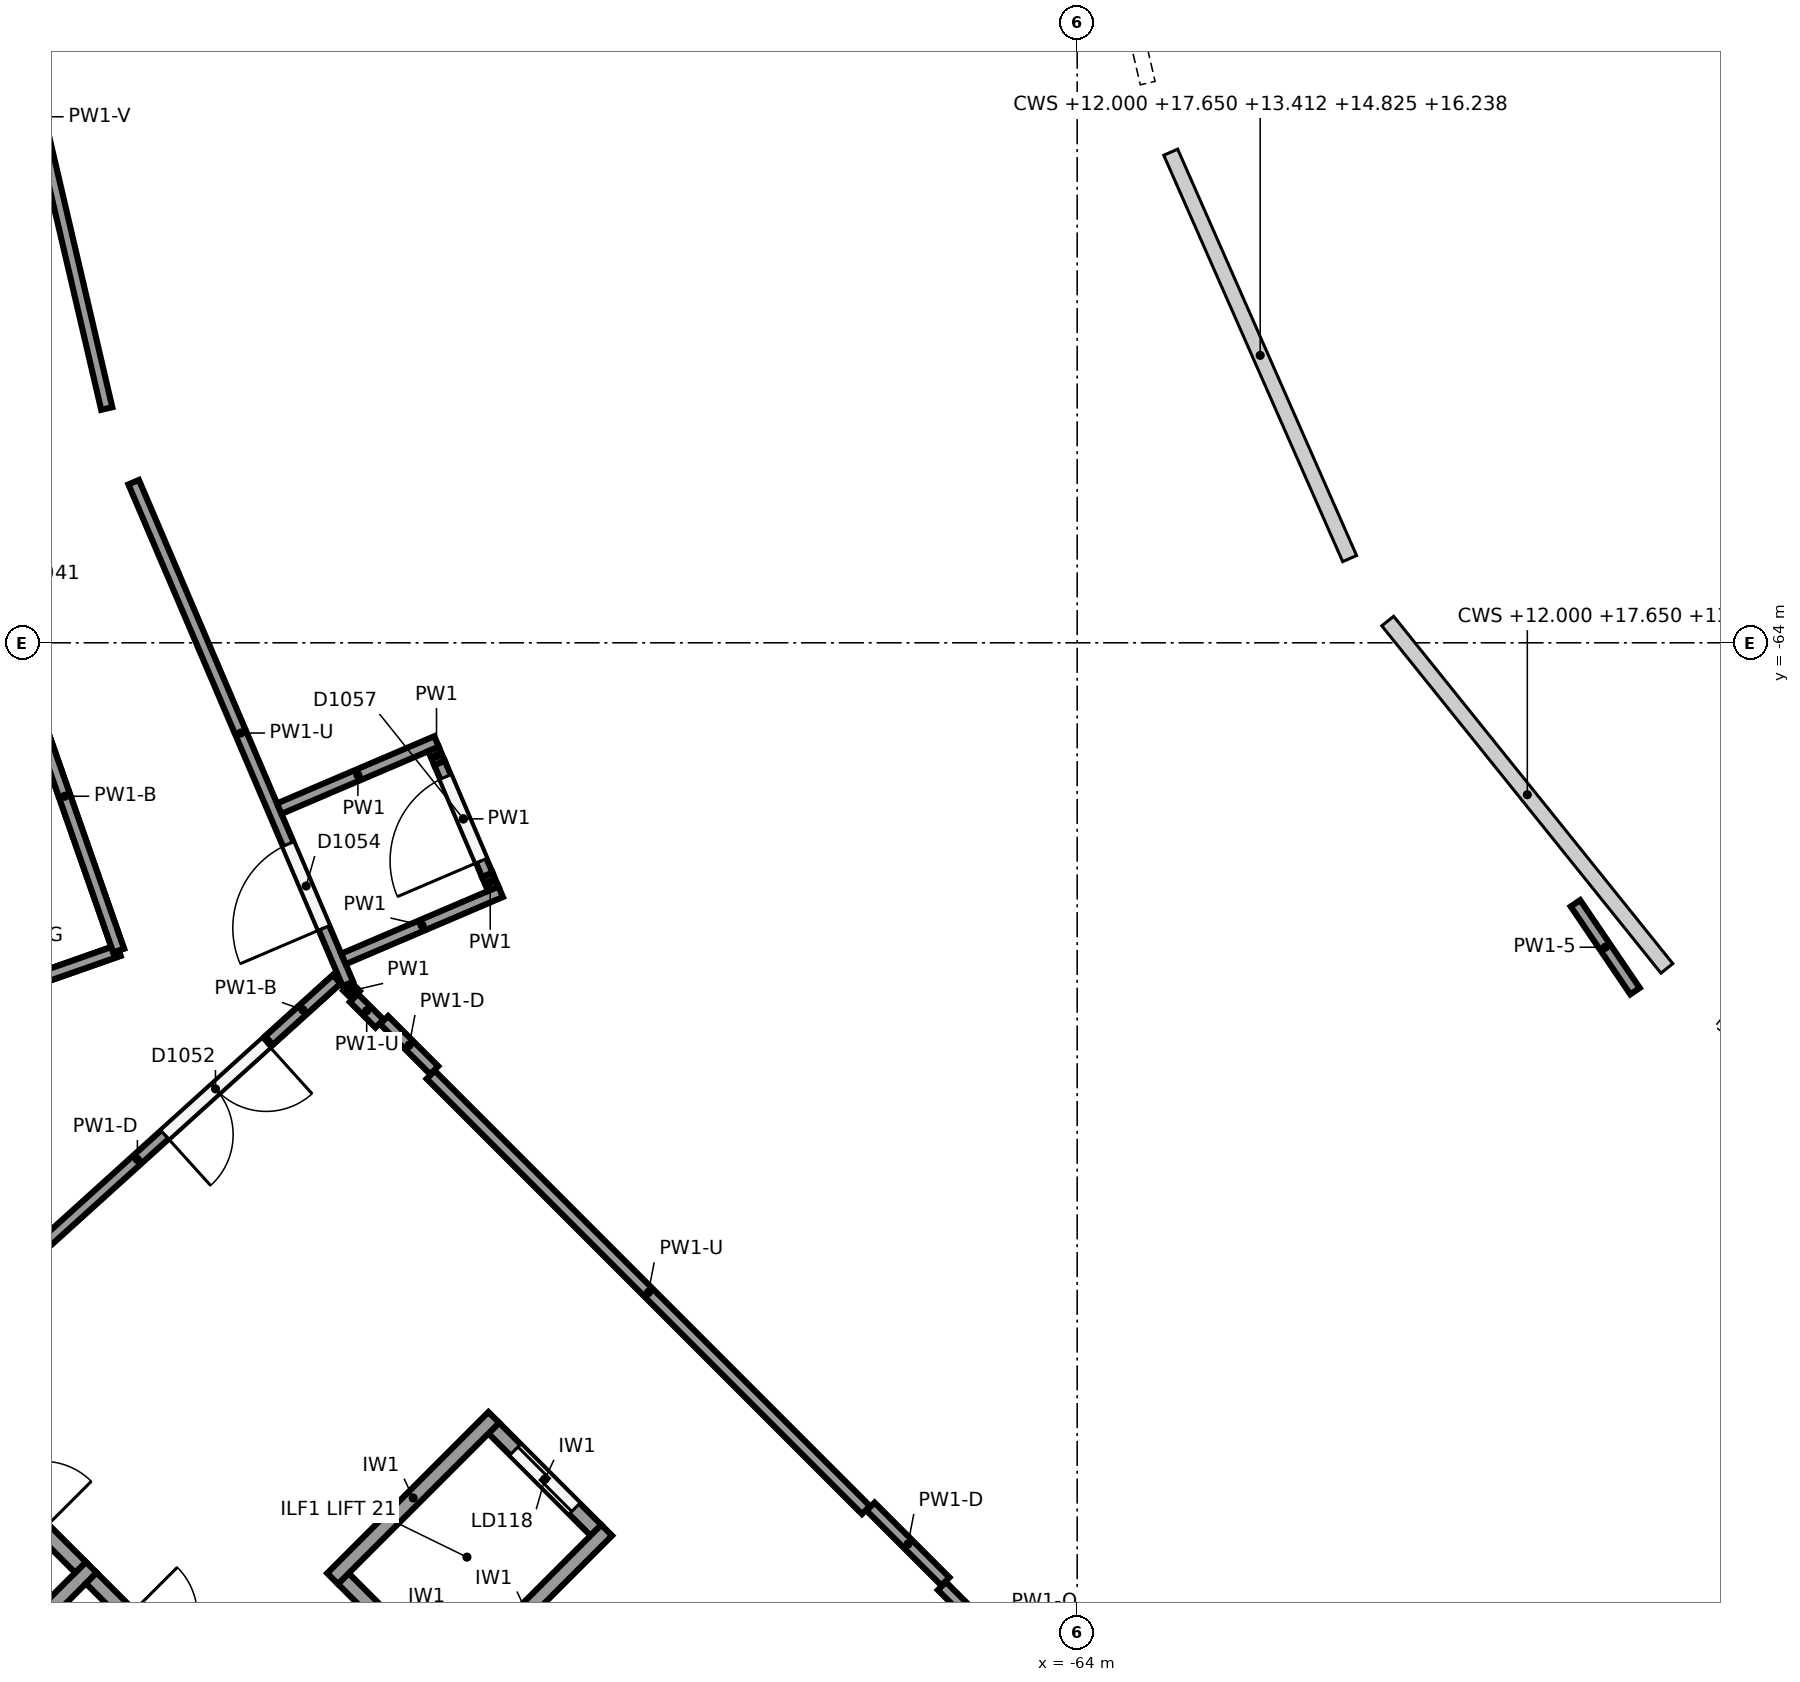
"""IFC4 building model, lengths in metres.
Left out: names, types, materials, properties, quantities, classifications, styles, units other than length and angle.
Written with IfcOpenShell. Run it as: python <this file> out.ifc"""

import sys

from ifc_helpers import new_model, si_unit, direction, frame, frame_2d, origin, origin_2d, place, context, subcontext, project, spatial, rectangle, circle, extrude, element, fill, save


model = new_model("IFC4")
c1 = context("Model", 3, precision=1e-05, world=origin(), true_north=direction((0.0, 1.0)))
c2 = subcontext(c1, "Body", "Model", "MODEL_VIEW")
j1 = project(units=[si_unit("LENGTHUNIT", "METRE"), si_unit("PLANEANGLEUNIT", "RADIAN")], contexts=[c1])
p1 = place(None, origin())
s1 = spatial("IfcSite", under=j1, at=p1, CompositionType="ELEMENT")
p2 = place(p1, origin())
s2 = spatial("IfcBuilding", under=s1, at=p2, CompositionType="ELEMENT")
p3 = place(p2, frame((0.0, 0.0, 12.0)))
s3 = spatial("IfcBuildingStorey", under=s2, at=p3, CompositionType="ELEMENT", Elevation=12.0)
p4 = place(p3, frame((-61.723, -56.716, 0.0), z_axis=(0.0, 0.0, 1.0), x_axis=(1.0, 0.0, 0.0)))
e1 = element("IfcColumn", 1, at=p4, inside=s3, PredefinedType="COLUMN", context=c2, shape_type="SweptSolid", body=[
    extrude(circle(Radius=0.45, at=origin_2d()), origin(), (0.0, 0.0, 1.0), 2.877),
])
p5 = place(p3, frame((-62.964, -57.104, 0.0), z_axis=(0.0, 0.0, 1.0), x_axis=(1.0, 0.0, 0.0)))
e2 = element("IfcColumn", 2, at=p5, inside=s3, PredefinedType="COLUMN", context=c2, shape_type="SweptSolid", body=[
    extrude(circle(Radius=0.4, at=origin_2d()), origin(), (0.0, 0.0, 1.0), 4.305),
])
p6 = place(p3, frame((-71.17, -59.677, 0.0), z_axis=(0.0, 0.0, 1.0), x_axis=(1.0, 0.0, 0.0)))
e3 = element("IfcColumn", 3, at=p6, inside=s3, PredefinedType="COLUMN", context=c2, shape_type="SweptSolid", body=[
    extrude(circle(Radius=0.45, at=origin_2d()), origin(), (0.0, 0.0, 1.0), 6.0),
])
p7 = place(p3, frame((-59.049, -62.766, 0.0), z_axis=(0.0, 0.0, 1.0), x_axis=(1.0, 0.0, 0.0)))
e4 = element("IfcColumn", 4, at=p7, inside=s3, PredefinedType="COLUMN", context=c2, shape_type="SweptSolid", body=[
    extrude(circle(Radius=0.45, at=origin_2d()), origin(), (0.0, 0.0, 1.0), 3.132),
])
p8 = place(p3, frame((-60.222, -63.331, 0.0), z_axis=(0.0, 0.0, 1.0), x_axis=(1.0, 0.0, 0.0)))
e5 = element("IfcColumn", 5, at=p8, inside=s3, PredefinedType="COLUMN", context=c2, shape_type="SweptSolid", body=[
    extrude(circle(Radius=0.4, at=origin_2d()), origin(), (0.0, 0.0, 1.0), 4.561),
])
p9 = place(p3, frame((-67.972, -67.058, 0.0), z_axis=(0.0, 0.0, 1.0), x_axis=(1.0, 0.0, 0.0)))
e6 = element("IfcColumn", 6, at=p9, inside=s3, PredefinedType="COLUMN", context=c2, shape_type="SweptSolid", body=[
    extrude(circle(Radius=0.45, at=origin_2d()), origin(), (0.0, 0.0, 1.0), 6.0),
])
p10 = place(p3, frame((-55.94, -68.658, 0.0), z_axis=(0.0, 0.0, 1.0), x_axis=(1.0, 0.0, 0.0)))
e7 = element("IfcColumn", 7, at=p10, inside=s3, PredefinedType="COLUMN", context=c2, shape_type="SweptSolid", body=[
    extrude(circle(Radius=0.4, at=origin_2d()), origin(), (0.0, 0.0, 1.0), 4.729),
])
p11 = place(p3, frame((-63.068, -73.47, 0.0), z_axis=(0.0, 0.0, 1.0), x_axis=(1.0, 0.0, 0.0)))
e8 = element("IfcColumn", 8, at=p11, inside=s3, PredefinedType="COLUMN", context=c2, shape_type="SweptSolid", body=[
    extrude(circle(Radius=0.45, at=origin_2d()), origin(), (0.0, 0.0, 1.0), 6.0),
])
p12 = place(p3, frame((-78.173, -77.365, 0.0), z_axis=(0.0, 0.0, 1.0), x_axis=(0.707178586901, 0.707034968179, 0.0)))
e9 = element("IfcWall", 9, at=p12, inside=s3, PredefinedType="SHEAR", context=c2, shape_type="SweptSolid", body=[
    extrude(rectangle(XDim=1.7, YDim=0.2, at=frame_2d((0.85, 0.0))), origin(), (0.0, 0.0, 1.0), 5.65),
])
p13 = place(p3, frame((-79.375, -73.9, 0.0), z_axis=(0.0, 0.0, 1.0), x_axis=(0.707068634461, -0.707144925854, 0.0)))
e10 = element("IfcWall", 10, at=p13, inside=s3, PredefinedType="SHEAR", context=c2, shape_type="SweptSolid", body=[
    extrude(rectangle(XDim=3.2, YDim=0.2, at=frame_2d((1.6, 0.0))), origin(), (0.0, 0.0, 1.0), 5.65),
])
p14 = place(p13, frame((0.7, 0.0, 0.0)))
e11 = element("IfcOpeningElement", 11, at=p14, cuts=e10, PredefinedType="OPENING", context=c2, shape_type="SweptSolid", body=[
    extrude(rectangle(XDim=1.8, YDim=2.1, at=frame_2d((0.9, 1.05))), frame((0.0, 0.11, 0.0), z_axis=(0.0, -1.0, 0.0), x_axis=(1.0, 0.0, 0.0)), (0.0, 0.0, 1.0), 0.22),
])
p15 = place(p3, frame((-76.971, -76.304, 0.0), z_axis=(0.0, 0.0, 1.0), x_axis=(0.707106781187, -0.707106781187, 0.0)))
e12 = element("IfcWall", 12, at=p15, inside=s3, PredefinedType="SHEAR", context=c2, shape_type="SweptSolid", body=[
    extrude(rectangle(XDim=3.2, YDim=0.2, at=frame_2d((1.6, 0.0))), origin(), (0.0, 0.0, 1.0), 5.65),
])
p16 = place(p15, frame((0.7, 0.0, 0.0)))
e13 = element("IfcOpeningElement", 13, at=p16, cuts=e12, PredefinedType="OPENING", context=c2, shape_type="SweptSolid", body=[
    extrude(rectangle(XDim=1.8, YDim=2.1, at=frame_2d((0.9, 1.05))), frame((0.0, 0.11, 0.0), z_axis=(0.0, -1.0, 0.0), x_axis=(1.0, 0.0, 0.0)), (0.0, 0.0, 1.0), 0.22),
])
for number, where, z_axis, x_axis in (
    (14, (-73.797, -76.312, 0.0), (0.0, 0.0, 1.0), (0.707, 0.707, 0.0)),
    (15, (-72.312, -77.797, 0.0), (0.0, 0.0, 1.0), (0.707, 0.707, 0.0)),
):
    element("IfcWall", number, at=place(p3, frame(where, z_axis=z_axis, x_axis=x_axis)), inside=s3, PredefinedType="SHEAR", context=c2, shape_type="SweptSolid", body=[
        extrude(rectangle(XDim=3.0, YDim=0.2, at=frame_2d((1.5, 0.0))), origin(), (0.0, 0.0, 1.0), 5.65),
    ])
p17 = place(p3, frame((-73.656, -76.312, 0.0), z_axis=(0.0, 0.0, 1.0), x_axis=(0.707106781187, -0.707106781187, 0.0)))
e16 = element("IfcWall", 16, at=p17, inside=s3, PredefinedType="SHEAR", context=c2, shape_type="SweptSolid", body=[
    extrude(rectangle(XDim=1.9, YDim=0.2, at=frame_2d((0.95, 0.0))), origin(), (0.0, 0.0, 1.0), 5.65),
])
p18 = place(p3, frame((-71.676, -74.332, 0.0), z_axis=(0.0, 0.0, 1.0), x_axis=(0.707106781187, -0.707106781187, 0.0)))
e17 = element("IfcWall", 17, at=p18, inside=s3, PredefinedType="SHEAR", context=c2, shape_type="SweptSolid", body=[
    extrude(rectangle(XDim=1.9, YDim=0.2, at=frame_2d((0.95, 0.0))), origin(), (0.0, 0.0, 1.0), 5.65),
])
p19 = place(p18, frame((0.4, 0.0, 0.0)))
e18 = element("IfcOpeningElement", 18, at=p19, cuts=e17, PredefinedType="OPENING", context=c2, shape_type="SweptSolid", body=[
    extrude(rectangle(XDim=1.1, YDim=2.1, at=frame_2d((0.55, 1.05))), frame((0.0, 0.11, 0.0), z_axis=(0.0, -1.0, 0.0), x_axis=(1.0, 0.0, 0.0)), (0.0, 0.0, 1.0), 0.22),
])
p20 = place(p3, frame((-76.768, -60.918, 0.0), z_axis=(0.0, 0.0, 1.0), x_axis=(-0.226944673482, 0.973907652284, 0.0)))
e19 = element("IfcWall", 19, at=p20, inside=s3, PredefinedType="PARTITIONING", context=c2, shape_type="SweptSolid", body=[
    extrude(rectangle(XDim=7.882, YDim=0.15, at=frame_2d((3.941, 0.0))), origin(), (0.0, 0.0, 1.0), 3.962),
])
p21 = place(p3, frame((-57.444, -67.427, 0.0), z_axis=(0.0, 0.0, 1.0), x_axis=(0.56118064085, -0.827693354048, 0.0)))
e20 = element("IfcWall", 20, at=p21, inside=s3, PredefinedType="PARTITIONING", context=c2, shape_type="SweptSolid", body=[
    extrude(rectangle(XDim=1.396, YDim=0.15, at=frame_2d((0.698, 0.0))), origin(), (0.0, 0.0, 1.0), 4.156),
])
p22 = place(p3, frame((-66.779, -75.41, 0.0), z_axis=(0.0, 0.0, 1.0), x_axis=(-0.707091708943, 0.707121853109, 0.0)))
e21 = element("IfcWall", 21, at=p22, inside=s3, PredefinedType="PARTITIONING", context=c2, shape_type="SweptSolid", body=[
    extrude(rectangle(XDim=8.099, YDim=0.15, at=frame_2d((4.05, 0.0))), origin(), (0.0, 0.0, 1.0), 4.187),
])
p23 = place(p3, frame((-73.179, -69.01, 0.0), z_axis=(0.0, 0.0, 1.0), x_axis=(-0.707106781187, 0.707106781187, 0.0)))
e22 = element("IfcWall", 22, at=p23, inside=s3, PredefinedType="PARTITIONING", context=c2, shape_type="SweptSolid", body=[
    extrude(rectangle(XDim=0.477, YDim=0.15, at=frame_2d((0.238, 0.0))), origin(), (0.0, 0.0, 1.0), 4.187),
])
p24 = place(p3, frame((-73.595, -68.488, 0.0), z_axis=(0.0, 0.0, 1.0), x_axis=(-0.392716080943, 0.919659763047, 0.0)))
e23 = element("IfcWall", 23, at=p24, inside=s3, PredefinedType="PARTITIONING", context=c2, shape_type="SweptSolid", body=[
    extrude(rectangle(XDim=7.177, YDim=0.15, at=frame_2d((3.589, 0.0))), origin(), (0.0, 0.0, 1.0), 4.187),
])
p25 = place(p24, frame((0.8, 0.0, 0.0)))
e24 = element("IfcOpeningElement", 24, at=p25, cuts=e23, PredefinedType="OPENING", context=c2, shape_type="SweptSolid", body=[
    extrude(rectangle(XDim=1.2, YDim=2.1, at=frame_2d((0.6, 1.05))), frame((0.0, 0.085, 0.0), z_axis=(0.0, -1.0, 0.0), x_axis=(1.0, 0.0, 0.0)), (0.0, 0.0, 1.0), 0.17),
])
p26 = place(p3, frame((-64.216, -77.973, 0.0), z_axis=(0.0, 0.0, 1.0), x_axis=(-0.707161957089, 0.707051600978, 0.0)))
e25 = element("IfcWall", 25, at=p26, inside=s3, PredefinedType="PARTITIONING", context=c2, shape_type="SweptSolid", body=[
    extrude(rectangle(XDim=2.212, YDim=0.15, at=frame_2d((1.106, 0.0))), origin(), (0.0, 0.0, 1.0), 4.118),
])
p27 = place(p3, frame((-82.605, -70.154, 0.0), z_axis=(0.0, 0.0, 1.0), x_axis=(0.943452018302, 0.331509108716, 0.0)))
e26 = element("IfcWall", 26, at=p27, inside=s3, PredefinedType="PARTITIONING", context=c2, shape_type="SweptSolid", body=[
    extrude(rectangle(XDim=6.353, YDim=0.15, at=frame_2d((3.176, 0.0))), origin(), (0.0, 0.0, 1.0), 4.75),
])
p28 = place(p27, frame((0.65, 0.0, 0.0)))
e27 = element("IfcOpeningElement", 27, at=p28, cuts=e26, PredefinedType="OPENING", context=c2, shape_type="SweptSolid", body=[
    extrude(rectangle(XDim=1.8, YDim=2.1, at=frame_2d((0.9, 1.05))), frame((0.0, 0.085, 0.0), z_axis=(0.0, -1.0, 0.0), x_axis=(1.0, 0.0, 0.0)), (0.0, 0.0, 1.0), 0.17),
])
p29 = place(p3, frame((-78.917, -68.858, 4.75), z_axis=(0.0, 0.0, 1.0), x_axis=(0.943443246904, 0.331534070454, 0.0)))
e28 = element("IfcWall", 28, at=p29, inside=s3, PredefinedType="PARTITIONING", context=c2, shape_type="SweptSolid", body=[
    extrude(rectangle(XDim=2.443, YDim=0.15, at=frame_2d((1.222, 0.0))), origin(), (0.0, 0.0, 1.0), 0.9),
])
p30 = place(p3, frame((-76.612, -68.048, 0.0), z_axis=(0.0, 0.0, 1.0), x_axis=(-0.330286915076, 0.943880582346, 0.0)))
e29 = element("IfcWall", 29, at=p30, inside=s3, PredefinedType="PARTITIONING", context=c2, shape_type="SweptSolid", body=[
    extrude(rectangle(XDim=13.87, YDim=0.15, at=frame_2d((6.935, 0.0))), origin(), (0.0, 0.0, 1.0), 4.55),
])
p31 = place(p30, frame((4.35, 0.0, 0.0)))
e30 = element("IfcOpeningElement", 30, at=p31, cuts=e29, PredefinedType="OPENING", context=c2, shape_type="SweptSolid", body=[
    extrude(rectangle(XDim=1.8, YDim=2.1, at=frame_2d((0.9, 1.05))), frame((0.0, 0.085, 0.0), z_axis=(0.0, -1.0, 0.0), x_axis=(1.0, 0.0, 0.0)), (0.0, 0.0, 1.0), 0.17),
])
p32 = place(p3, frame((-76.612, -68.048, 4.55), z_axis=(0.0, 0.0, 1.0), x_axis=(-0.330279608941, 0.94388313891, 0.0)))
e31 = element("IfcWall", 31, at=p32, inside=s3, PredefinedType="PARTITIONING", context=c2, shape_type="SweptSolid", body=[
    extrude(rectangle(XDim=4.3, YDim=0.15, at=frame_2d((2.15, 0.0))), origin(), (0.0, 0.0, 1.0), 1.1),
])
p33 = place(p3, frame((-65.734, -76.349, 0.0), z_axis=(0.0, 0.0, 1.0), x_axis=(-0.707106781187, 0.707106781187, 0.0)))
e32 = element("IfcWall", 32, at=p33, inside=s3, PredefinedType="PARTITIONING", context=c2, shape_type="SweptSolid", body=[
    extrude(rectangle(XDim=1.393, YDim=0.15, at=frame_2d((0.696, 0.0))), origin(), (0.0, 0.0, 1.0), 4.55),
])
p34 = place(p3, frame((-72.46, -69.623, 0.0), z_axis=(0.0, 0.0, 1.0), x_axis=(-0.707106781187, 0.707106781187, 0.0)))
e33 = element("IfcWall", 33, at=p34, inside=s3, PredefinedType="PARTITIONING", context=c2, shape_type="SweptSolid", body=[
    extrude(rectangle(XDim=0.933, YDim=0.15, at=frame_2d((0.466, 0.0))), origin(), (0.0, 0.0, 1.0), 4.55),
])
p35 = place(p3, frame((-73.492, -68.634, 0.0), z_axis=(0.0, 0.0, 1.0), x_axis=(-0.706331870343, 0.707880843743, 0.0)))
e34 = element("IfcWall", 34, at=p35, inside=s3, PredefinedType="PARTITIONING", context=c2, shape_type="SweptSolid", body=[
    extrude(rectangle(XDim=0.158, YDim=0.15, at=frame_2d((0.079, 0.0))), origin(), (0.0, 0.0, 1.0), 5.65),
])
p36 = place(p3, frame((-73.742, -68.427, 0.0), z_axis=(0.0, 0.0, 1.0), x_axis=(-0.741827757785, -0.670590469496, 0.0)))
e35 = element("IfcWall", 35, at=p36, inside=s3, PredefinedType="PARTITIONING", context=c2, shape_type="SweptSolid", body=[
    extrude(rectangle(XDim=7.07, YDim=0.15, at=frame_2d((3.535, 0.0))), origin(), (0.0, 0.0, 1.0), 4.55),
])
p37 = place(p36, frame((1.25, 0.0, 0.0)))
e36 = element("IfcOpeningElement", 36, at=p37, cuts=e35, PredefinedType="OPENING", context=c2, shape_type="SweptSolid", body=[
    extrude(rectangle(XDim=1.8, YDim=2.1, at=frame_2d((0.9, 1.05))), frame((0.0, 0.085, 0.0), z_axis=(0.0, -1.0, 0.0), x_axis=(1.0, 0.0, 0.0)), (0.0, 0.0, 1.0), 0.17),
])
p38 = place(p3, frame((-73.742, -68.427, 4.55), z_axis=(0.0, 0.0, 1.0), x_axis=(-0.741906759341, -0.670503065201, 0.0)))
e37 = element("IfcWall", 37, at=p38, inside=s3, PredefinedType="PARTITIONING", context=c2, shape_type="SweptSolid", body=[
    extrude(rectangle(XDim=1.2, YDim=0.15, at=frame_2d((0.6, 0.0))), origin(), (0.0, 0.0, 1.0), 1.1),
])
p39 = place(p3, frame((-73.654, -68.159, 0.0), z_axis=(0.0, 0.0, 1.0), x_axis=(0.919638165537, 0.392766653993, 0.0)))
e38 = element("IfcWall", 38, at=p39, inside=s3, PredefinedType="PARTITIONING", context=c2, shape_type="SweptSolid", body=[
    extrude(rectangle(XDim=2.25, YDim=0.15, at=frame_2d((1.125, 0.0))), origin(), (0.0, 0.0, 1.0), 5.65),
])
p40 = place(p3, frame((-74.498, -66.182, 0.0), z_axis=(0.0, 0.0, 1.0), x_axis=(0.919660619765, 0.392714074682, 0.0)))
e39 = element("IfcWall", 39, at=p40, inside=s3, PredefinedType="PARTITIONING", context=c2, shape_type="SweptSolid", body=[
    extrude(rectangle(XDim=2.25, YDim=0.15, at=frame_2d((1.125, 0.0))), origin(), (0.0, 0.0, 1.0), 5.65),
])
p41 = place(p3, frame((-71.683, -67.236, 0.0), z_axis=(0.0, 0.0, 1.0), x_axis=(-0.391709037985, 0.920089142182, 0.0)))
e40 = element("IfcWall", 40, at=p41, inside=s3, PredefinedType="PARTITIONING", context=c2, shape_type="SweptSolid", body=[
    extrude(rectangle(XDim=0.2, YDim=0.15, at=frame_2d((0.1, 0.0))), origin(), (0.0, 0.0, 1.0), 5.65),
])
p42 = place(p3, frame((-71.762, -67.052, 0.0), z_axis=(0.0, 0.0, 1.0), x_axis=(-0.392758797822, 0.919641520775, 0.0)))
e41 = element("IfcWall", 41, at=p42, inside=s3, PredefinedType="PARTITIONING", context=c2, shape_type="SweptSolid", body=[
    extrude(rectangle(XDim=1.6, YDim=0.15, at=frame_2d((0.8, 0.0))), origin(), (0.0, 0.0, 1.0), 5.65),
])
p43 = place(p42, frame((0.2, 0.0, 0.0)))
e42 = element("IfcOpeningElement", 42, at=p43, cuts=e41, PredefinedType="OPENING", context=c2, shape_type="SweptSolid", body=[
    extrude(rectangle(XDim=1.2, YDim=2.1, at=frame_2d((0.6, 1.05))), frame((0.0, 0.085, 0.0), z_axis=(0.0, -1.0, 0.0), x_axis=(1.0, 0.0, 0.0)), (0.0, 0.0, 1.0), 0.17),
])
p44 = place(p3, frame((-72.39, -65.581, 0.0), z_axis=(0.0, 0.0, 1.0), x_axis=(-0.393182323567, 0.91946052685, 0.0)))
e43 = element("IfcWall", 43, at=p44, inside=s3, PredefinedType="PARTITIONING", context=c2, shape_type="SweptSolid", body=[
    extrude(rectangle(XDim=0.2, YDim=0.15, at=frame_2d((0.1, 0.0))), origin(), (0.0, 0.0, 1.0), 5.65),
])
p45 = place(p19, origin())
e44 = element("IfcDoor", 44, at=p45, inside=s3, OperationType="SLIDING_TO_RIGHT", PredefinedType="DOOR", context=c2, shape_type="SweptSolid", body=[
    extrude(rectangle(XDim=1.1, YDim=2.1, at=frame_2d((0.55, 1.05))), frame((0.0, 0.025, 0.0), z_axis=(0.0, -1.0, 0.0), x_axis=(1.0, 0.0, 0.0)), (0.0, 0.0, 1.0), 0.05),
])
fill(e18, e44)
p46 = place(p25, origin())
e45 = element("IfcDoor", 45, at=p46, inside=s3, OperationType="SINGLE_SWING_LEFT", PredefinedType="DOOR", context=c2, shape_type="SweptSolid", body=[
    extrude(rectangle(XDim=1.2, YDim=2.1, at=frame_2d((0.6, 1.05))), frame((0.0, 0.025, 0.0), z_axis=(0.0, -1.0, 0.0), x_axis=(1.0, 0.0, 0.0)), (0.0, 0.0, 1.0), 0.05),
])
fill(e24, e45)
p47 = place(p37, origin())
e46 = element("IfcDoor", 46, at=p47, inside=s3, OperationType="DOUBLE_DOOR_SINGLE_SWING", PredefinedType="DOOR", context=c2, shape_type="SweptSolid", body=[
    extrude(rectangle(XDim=1.8, YDim=2.1, at=frame_2d((0.9, 1.05))), frame((0.0, 0.025, 0.0), z_axis=(0.0, -1.0, 0.0), x_axis=(1.0, 0.0, 0.0)), (0.0, 0.0, 1.0), 0.05),
])
fill(e36, e46)
p48 = place(p43, origin())
e47 = element("IfcDoor", 47, at=p48, inside=s3, OperationType="SINGLE_SWING_LEFT", PredefinedType="DOOR", context=c2, shape_type="SweptSolid", body=[
    extrude(rectangle(XDim=1.2, YDim=2.1, at=frame_2d((0.6, 1.05))), frame((0.0, 0.025, 0.0), z_axis=(0.0, -1.0, 0.0), x_axis=(1.0, 0.0, 0.0)), (0.0, 0.0, 1.0), 0.05),
])
fill(e42, e47)
save(model, sys.argv[1])
